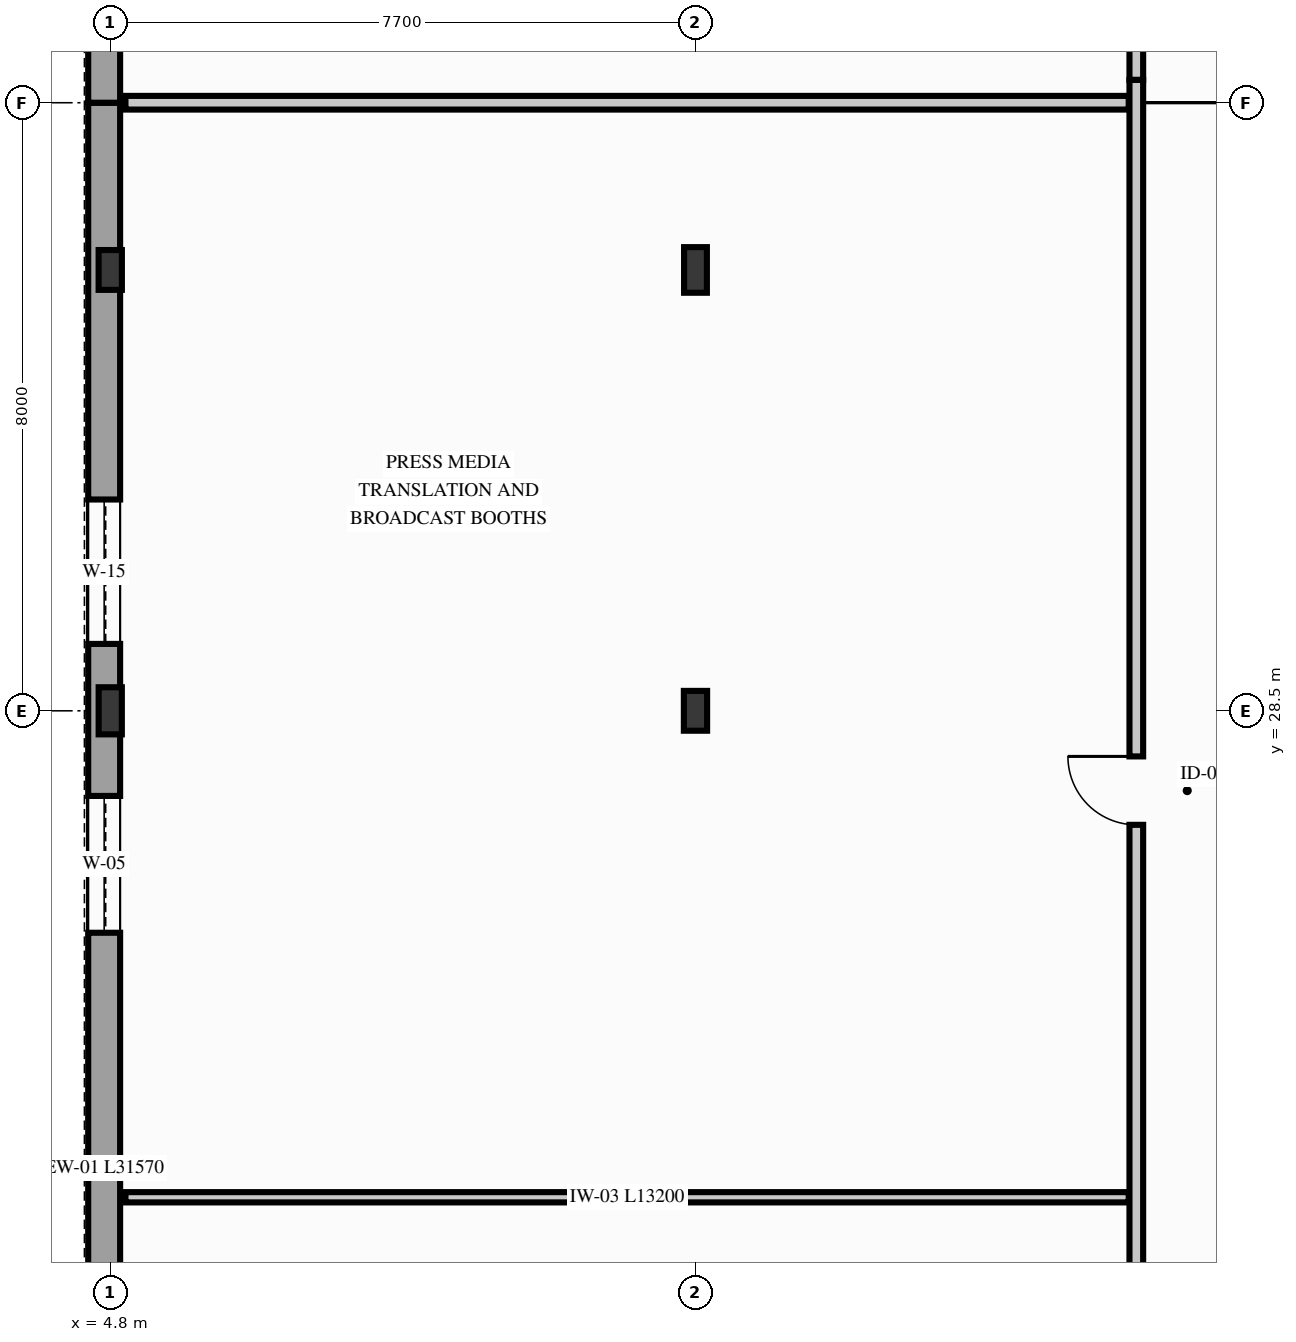
"""IFC4 building model, lengths in metres.
Left out: names, types, materials, properties, quantities, classifications, styles, units other than length and angle.
Written with IfcOpenShell. Run it as: python <this file> out.ifc"""

import sys

from ifc_helpers import new_model, si_unit, direction, frame, frame_2d, origin, origin_2d, place, context, subcontext, project, spatial, rectangle, i_section, extrude, element, fill, save


model = new_model("IFC4")
c1 = context("Model", 3, precision=1e-05, world=origin(), true_north=direction((0.0, 1.0)))
c2 = subcontext(c1, "Body", "Model", "MODEL_VIEW")
j1 = project(units=[si_unit("LENGTHUNIT", "METRE"), si_unit("PLANEANGLEUNIT", "RADIAN")], contexts=[c1])
p1 = place(None, origin())
s1 = spatial("IfcSite", under=j1, at=p1, CompositionType="ELEMENT")
p2 = place(p1, origin())
s2 = spatial("IfcBuilding", under=s1, at=p2, CompositionType="ELEMENT")
p3 = place(p2, frame((0.0, 0.0, 5.1)))
s3 = spatial("IfcBuildingStorey", under=s2, at=p3, CompositionType="ELEMENT", Elevation=5.1)
p4 = place(p3, frame((4.8, 28.5, 0.0), z_axis=(0.0, 0.0, 1.0), x_axis=(1.0, 0.0, 0.0)))
e1 = element("IfcColumn", 1, at=p4, inside=s3, PredefinedType="COLUMN", context=c2, shape_type="SweptSolid", body=[
    extrude(i_section(OverallWidth=0.305, OverallDepth=0.62, WebThickness=0.021, FlangeThickness=0.04, FilletRadius=0.027, at=origin_2d()), origin(), (0.0, 0.0, 1.0), 4.2),
])
for number, where, z_axis, x_axis in (
    (2, (4.8, 34.3, 0.0), (0.0, 0.0, 1.0), (1.0, 0.0, 0.0)),
    (3, (12.5, 28.5, 0.0), (0.0, 0.0, 1.0), (1.0, 0.0, 0.0)),
):
    element("IfcColumn", number, at=place(p3, frame(where, z_axis=z_axis, x_axis=x_axis)), inside=s3, PredefinedType="COLUMN", context=c2, shape_type="SweptSolid", body=[
        extrude(i_section(OverallWidth=0.306, OverallDepth=0.524, WebThickness=0.021, FlangeThickness=0.04, FilletRadius=0.027, at=origin_2d()), origin(), (0.0, 0.0, 1.0), 4.2),
    ])
p5 = place(p3, frame((12.5, 34.3, 0.0), z_axis=(0.0, 0.0, 1.0), x_axis=(1.0, 0.0, 0.0)))
e4 = element("IfcColumn", 4, at=p5, inside=s3, PredefinedType="COLUMN", context=c2, shape_type="SweptSolid", body=[
    extrude(i_section(OverallWidth=0.3, OverallDepth=0.6, WebThickness=0.015, FlangeThickness=0.03, FilletRadius=0.027, at=origin_2d()), origin(), (0.0, 0.0, 1.0), 4.2),
])
p6 = place(p3, frame((4.72, 4.93, 0.0), z_axis=(0.0, 0.0, 1.0), x_axis=(0.0, 1.0, 0.0)))
e5 = element("IfcWall", 5, at=p6, inside=s3, PredefinedType="SOLIDWALL", context=c2, shape_type="SweptSolid", body=[
    extrude(rectangle(XDim=31.57, YDim=0.42, at=frame_2d((15.785, 0.0))), origin(), (0.0, 0.0, 1.0), 3.68),
])
p7 = place(p6, frame((1.65, 0.0, 0.85)))
e6 = element("IfcOpeningElement", 6, at=p7, cuts=e5, PredefinedType="OPENING", context=c2, shape_type="SweptSolid", body=[
    extrude(rectangle(XDim=1.3, YDim=2.15, at=frame_2d((0.65, 1.075))), frame((0.0, 0.22, 0.0), z_axis=(0.0, -1.0, 0.0), x_axis=(1.0, 0.0, 0.0)), (0.0, 0.0, 1.0), 0.44),
])
p8 = place(p6, frame((5.45, 0.0, 0.84)))
e7 = element("IfcOpeningElement", 7, at=p8, cuts=e5, PredefinedType="OPENING", context=c2, shape_type="SweptSolid", body=[
    extrude(rectangle(XDim=1.5, YDim=2.3, at=frame_2d((0.75, 1.15))), frame((0.0, 0.22, 0.0), z_axis=(0.0, -1.0, 0.0), x_axis=(1.0, 0.0, 0.0)), (0.0, 0.0, 1.0), 0.44),
])
p9 = place(p6, frame((9.25, 0.0, 0.74)))
e8 = element("IfcOpeningElement", 8, at=p9, cuts=e5, PredefinedType="OPENING", context=c2, shape_type="SweptSolid", body=[
    extrude(rectangle(XDim=1.6, YDim=2.4, at=frame_2d((0.8, 1.2))), frame((0.0, 0.22, 0.0), z_axis=(0.0, -1.0, 0.0), x_axis=(1.0, 0.0, 0.0)), (0.0, 0.0, 1.0), 0.44),
])
p10 = place(p6, frame((13.05, 0.0, 0.85)))
e9 = element("IfcOpeningElement", 9, at=p10, cuts=e5, PredefinedType="OPENING", context=c2, shape_type="SweptSolid", body=[
    extrude(rectangle(XDim=1.4, YDim=2.2, at=frame_2d((0.7, 1.1))), frame((0.0, 0.22, 0.0), z_axis=(0.0, -1.0, 0.0), x_axis=(1.0, 0.0, 0.0)), (0.0, 0.0, 1.0), 0.44),
])
p11 = place(p6, frame((20.65, 0.0, 0.74)))
e10 = element("IfcOpeningElement", 10, at=p11, cuts=e5, PredefinedType="OPENING", context=c2, shape_type="SweptSolid", body=[
    extrude(rectangle(XDim=1.8, YDim=2.4, at=frame_2d((0.9, 1.2))), frame((0.0, 0.22, 0.0), z_axis=(0.0, -1.0, 0.0), x_axis=(1.0, 0.0, 0.0)), (0.0, 0.0, 1.0), 0.44),
])
p12 = place(p6, frame((24.45, 0.0, 0.69)))
e11 = element("IfcOpeningElement", 11, at=p12, cuts=e5, PredefinedType="OPENING", context=c2, shape_type="SweptSolid", body=[
    extrude(rectangle(XDim=1.9, YDim=2.45, at=frame_2d((0.95, 1.225))), frame((0.0, 0.22, 0.0), z_axis=(0.0, -1.0, 0.0), x_axis=(1.0, 0.0, 0.0)), (0.0, 0.0, 1.0), 0.44),
])
p13 = place(p3, frame((4.72, 36.5, 0.0), z_axis=(0.0, 0.0, 1.0), x_axis=(0.0, 1.0, 0.0)))
e12 = element("IfcWall", 12, at=p13, inside=s3, PredefinedType="SOLIDWALL", context=c2, shape_type="SweptSolid", body=[
    extrude(rectangle(XDim=47.0, YDim=0.42, at=frame_2d((23.5, 0.0))), origin(), (0.0, 0.0, 1.0), 3.66),
])
p14 = place(p13, frame((1.65, 0.0, 0.74)))
e13 = element("IfcOpeningElement", 13, at=p14, cuts=e12, PredefinedType="OPENING", context=c2, shape_type="SweptSolid", body=[
    extrude(rectangle(XDim=1.6, YDim=2.4, at=frame_2d((0.8, 1.2))), frame((0.0, 0.22, 0.0), z_axis=(0.0, -1.0, 0.0), x_axis=(1.0, 0.0, 0.0)), (0.0, 0.0, 1.0), 0.44),
])
p15 = place(p13, frame((5.5, 0.0, 0.74)))
e14 = element("IfcOpeningElement", 14, at=p15, cuts=e12, PredefinedType="OPENING", context=c2, shape_type="SweptSolid", body=[
    extrude(rectangle(XDim=1.8, YDim=2.4, at=frame_2d((0.9, 1.2))), frame((0.0, 0.22, 0.0), z_axis=(0.0, -1.0, 0.0), x_axis=(1.0, 0.0, 0.0)), (0.0, 0.0, 1.0), 0.44),
])
p16 = place(p13, frame((9.35, 0.0, 0.84)))
e15 = element("IfcOpeningElement", 15, at=p16, cuts=e12, PredefinedType="OPENING", context=c2, shape_type="SweptSolid", body=[
    extrude(rectangle(XDim=1.5, YDim=2.3, at=frame_2d((0.75, 1.15))), frame((0.0, 0.22, 0.0), z_axis=(0.0, -1.0, 0.0), x_axis=(1.0, 0.0, 0.0)), (0.0, 0.0, 1.0), 0.44),
])
p17 = place(p13, frame((13.2, 0.0, 0.85)))
e16 = element("IfcOpeningElement", 16, at=p17, cuts=e12, PredefinedType="OPENING", context=c2, shape_type="SweptSolid", body=[
    extrude(rectangle(XDim=1.4, YDim=2.2, at=frame_2d((0.7, 1.1))), frame((0.0, 0.22, 0.0), z_axis=(0.0, -1.0, 0.0), x_axis=(1.0, 0.0, 0.0)), (0.0, 0.0, 1.0), 0.44),
])
p18 = place(p13, frame((20.9, 0.0, 0.74)))
e17 = element("IfcOpeningElement", 17, at=p18, cuts=e12, PredefinedType="OPENING", context=c2, shape_type="SweptSolid", body=[
    extrude(rectangle(XDim=2.4, YDim=2.4, at=frame_2d((1.2, 1.2))), frame((0.0, 0.22, 0.0), z_axis=(0.0, -1.0, 0.0), x_axis=(1.0, 0.0, 0.0)), (0.0, 0.0, 1.0), 0.44),
])
p19 = place(p13, frame((24.75, 0.0, 0.74)))
e18 = element("IfcOpeningElement", 18, at=p19, cuts=e12, PredefinedType="OPENING", context=c2, shape_type="SweptSolid", body=[
    extrude(rectangle(XDim=1.6, YDim=2.4, at=frame_2d((0.8, 1.2))), frame((0.0, 0.22, 0.0), z_axis=(0.0, -1.0, 0.0), x_axis=(1.0, 0.0, 0.0)), (0.0, 0.0, 1.0), 0.44),
])
p20 = place(p13, frame((28.6, 0.0, 0.74)))
e19 = element("IfcOpeningElement", 19, at=p20, cuts=e12, PredefinedType="OPENING", context=c2, shape_type="SweptSolid", body=[
    extrude(rectangle(XDim=1.8, YDim=2.4, at=frame_2d((0.9, 1.2))), frame((0.0, 0.22, 0.0), z_axis=(0.0, -1.0, 0.0), x_axis=(1.0, 0.0, 0.0)), (0.0, 0.0, 1.0), 0.44),
])
p21 = place(p13, frame((40.15, 0.0, 0.54)))
e20 = element("IfcOpeningElement", 20, at=p21, cuts=e12, PredefinedType="OPENING", context=c2, shape_type="SweptSolid", body=[
    extrude(rectangle(XDim=2.2, YDim=2.6, at=frame_2d((1.1, 1.3))), frame((0.0, 0.22, 0.0), z_axis=(0.0, -1.0, 0.0), x_axis=(1.0, 0.0, 0.0)), (0.0, 0.0, 1.0), 0.44),
])
p22 = place(p3, frame((18.3, 36.8, 0.0), z_axis=(0.0, 0.0, 1.0), x_axis=(0.0, 1.0, 0.0)))
e21 = element("IfcWall", 21, at=p22, inside=s3, PredefinedType="PARTITIONING", context=c2, shape_type="SweptSolid", body=[
    extrude(rectangle(XDim=35.95, YDim=0.18, at=frame_2d((17.975, 0.0))), origin(), (0.0, 0.0, 1.0), 3.658),
])
p23 = place(p22, frame((7.0, 0.0, 0.0)))
e22 = element("IfcOpeningElement", 22, at=p23, cuts=e21, PredefinedType="OPENING", context=c2, shape_type="SweptSolid", body=[
    extrude(rectangle(XDim=1.02, YDim=2.18, at=frame_2d((0.51, 1.09))), frame((0.0, 0.1, 0.0), z_axis=(0.0, -1.0, 0.0), x_axis=(1.0, 0.0, 0.0)), (0.0, 0.0, 1.0), 0.2),
])
p24 = place(p22, frame((22.0, 0.0, 0.0)))
e23 = element("IfcOpeningElement", 23, at=p24, cuts=e21, PredefinedType="OPENING", context=c2, shape_type="SweptSolid", body=[
    extrude(rectangle(XDim=1.05, YDim=2.2, at=frame_2d((0.525, 1.1))), frame((0.0, 0.1, 0.0), z_axis=(0.0, -1.0, 0.0), x_axis=(1.0, 0.0, 0.0)), (0.0, 0.0, 1.0), 0.2),
])
p25 = place(p3, frame((18.3, 5.0, 0.0), z_axis=(0.0, 0.0, 1.0), x_axis=(0.0, 1.0, 0.0)))
e24 = element("IfcWall", 24, at=p25, inside=s3, PredefinedType="PARTITIONING", context=c2, shape_type="SweptSolid", body=[
    extrude(rectangle(XDim=31.8, YDim=0.18, at=frame_2d((15.9, 0.0))), origin(), (0.0, 0.0, 1.0), 3.678),
])
p26 = place(p25, frame((7.5, 0.0, 0.0)))
e25 = element("IfcOpeningElement", 25, at=p26, cuts=e24, PredefinedType="OPENING", context=c2, shape_type="SweptSolid", body=[
    extrude(rectangle(XDim=1.76, YDim=2.36, at=frame_2d((0.88, 1.18))), frame((0.0, 0.1, 0.0), z_axis=(0.0, -1.0, 0.0), x_axis=(1.0, 0.0, 0.0)), (0.0, 0.0, 1.0), 0.2),
])
p27 = place(p25, frame((22.0, 0.0, 0.0)))
e26 = element("IfcOpeningElement", 26, at=p27, cuts=e24, PredefinedType="OPENING", context=c2, shape_type="SweptSolid", body=[
    extrude(rectangle(XDim=0.9, YDim=2.1, at=frame_2d((0.45, 1.05))), frame((0.0, 0.1, 0.0), z_axis=(0.0, -1.0, 0.0), x_axis=(1.0, 0.0, 0.0)), (0.0, 0.0, 1.0), 0.2),
])
p28 = place(p3, frame((5.0, 36.5, 0.0), z_axis=(0.0, 0.0, 1.0), x_axis=(1.0, 0.0, 0.0)))
e27 = element("IfcWall", 27, at=p28, inside=s3, PredefinedType="PARTITIONING", context=c2, shape_type="SweptSolid", body=[
    extrude(rectangle(XDim=13.2, YDim=0.18, at=frame_2d((6.6, 0.0))), origin(), (0.0, 0.0, 1.0), 3.92),
])
p29 = place(p3, frame((5.0, 22.1, 0.0), z_axis=(0.0, 0.0, 1.0), x_axis=(1.0, 0.0, 0.0)))
e28 = element("IfcWall", 28, at=p29, inside=s3, PredefinedType="PARTITIONING", context=c2, shape_type="SweptSolid", body=[
    extrude(rectangle(XDim=13.2, YDim=0.135, at=frame_2d((6.6, 0.0))), origin(), (0.0, 0.0, 1.0), 3.578),
])
p30 = place(p11, origin())
e29 = element("IfcWindow", 29, at=p30, inside=s3, PartitioningType="SINGLE_PANEL", PredefinedType="WINDOW", context=c2, shape_type="SweptSolid", body=[
    extrude(rectangle(XDim=1.8, YDim=2.4, at=frame_2d((0.9, 1.2))), frame((0.0, 0.03, 0.0), z_axis=(0.0, -1.0, 0.0), x_axis=(1.0, 0.0, 0.0)), (0.0, 0.0, 1.0), 0.06),
])
fill(e10, e29)
p31 = place(p12, origin())
e30 = element("IfcWindow", 30, at=p31, inside=s3, PartitioningType="SINGLE_PANEL", PredefinedType="WINDOW", context=c2, shape_type="SweptSolid", body=[
    extrude(rectangle(XDim=1.9, YDim=2.45, at=frame_2d((0.95, 1.225))), frame((0.0, 0.03, 0.0), z_axis=(0.0, -1.0, 0.0), x_axis=(1.0, 0.0, 0.0)), (0.0, 0.0, 1.0), 0.06),
])
fill(e11, e30)
p32 = place(p27, origin())
e31 = element("IfcDoor", 31, at=p32, inside=s3, OperationType="SINGLE_SWING_RIGHT", PredefinedType="DOOR", context=c2, shape_type="SweptSolid", body=[
    extrude(rectangle(XDim=0.9, YDim=2.1, at=frame_2d((0.45, 1.05))), frame((0.0, 0.025, 0.0), z_axis=(0.0, -1.0, 0.0), x_axis=(1.0, 0.0, 0.0)), (0.0, 0.0, 1.0), 0.05),
])
fill(e26, e31)
save(model, sys.argv[1])
